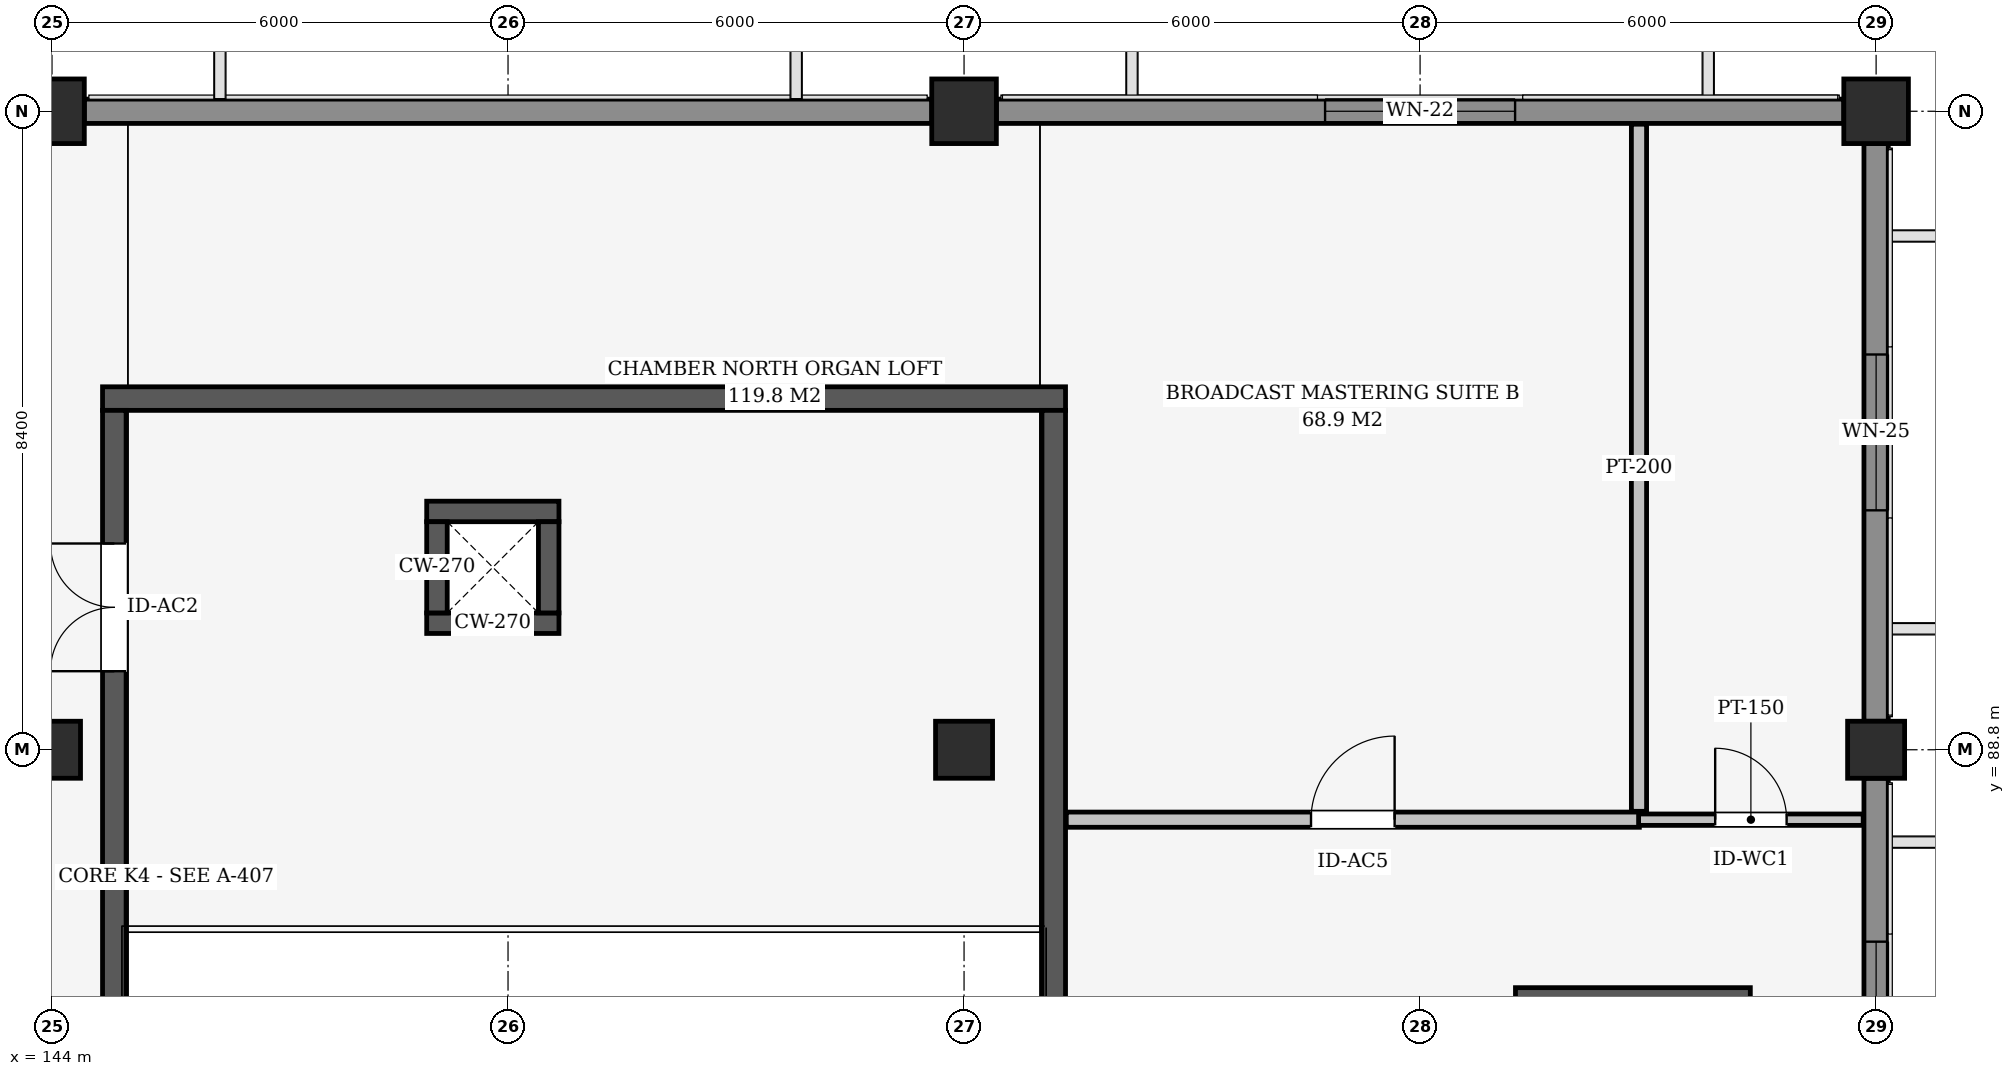
"""IFC4 building model, lengths in metres.
Left out: names, types, materials, properties, quantities, classifications, styles, units other than length and angle.
Written with IfcOpenShell. Run it as: python <this file> out.ifc"""

import sys

from ifc_helpers import new_model, si_unit, direction, frame, frame_2d, origin, origin_2d, place, context, subcontext, project, spatial, rectangle, extrude, element, fill, save


model = new_model("IFC4")
c1 = context("Model", 3, precision=1e-05, world=origin(), true_north=direction((0.0, 1.0)))
c2 = subcontext(c1, "Body", "Model", "MODEL_VIEW")
j1 = project(units=[si_unit("LENGTHUNIT", "METRE"), si_unit("PLANEANGLEUNIT", "RADIAN")], contexts=[c1])
p1 = place(None, origin())
s1 = spatial("IfcSite", under=j1, at=p1, CompositionType="ELEMENT")
p2 = place(p1, origin())
s2 = spatial("IfcBuilding", under=s1, at=p2, CompositionType="ELEMENT")
p3 = place(p2, frame((0.0, 0.0, 4.8)))
s3 = spatial("IfcBuildingStorey", under=s2, at=p3, CompositionType="ELEMENT", Elevation=4.8)
p4 = place(p3, frame((144.0, 88.8, 0.0), z_axis=(0.0, 0.0, 1.0), x_axis=(1.0, 0.0, 0.0)))
e1 = element("IfcColumn", 1, at=p4, inside=s3, PredefinedType="COLUMN", context=c2, shape_type="SweptSolid", body=[
    extrude(rectangle(XDim=0.75, YDim=0.75, at=origin_2d()), origin(), (0.0, 0.0, 1.0), 4.5),
])
p5 = place(p3, frame((144.0, 97.2, 0.0), z_axis=(0.0, 0.0, 1.0), x_axis=(1.0, 0.0, 0.0)))
e2 = element("IfcColumn", 2, at=p5, inside=s3, PredefinedType="COLUMN", context=c2, shape_type="SweptSolid", body=[
    extrude(rectangle(XDim=0.85, YDim=0.85, at=origin_2d()), origin(), (0.0, 0.0, 1.0), 4.5),
])
p6 = place(p3, frame((156.0, 88.8, 0.0), z_axis=(0.0, 0.0, 1.0), x_axis=(1.0, 0.0, 0.0)))
e3 = element("IfcColumn", 3, at=p6, inside=s3, PredefinedType="COLUMN", context=c2, shape_type="SweptSolid", body=[
    extrude(rectangle(XDim=0.75, YDim=0.75, at=origin_2d()), origin(), (0.0, 0.0, 1.0), 4.5),
])
p7 = place(p3, frame((156.0, 97.2, 0.0), z_axis=(0.0, 0.0, 1.0), x_axis=(1.0, 0.0, 0.0)))
e4 = element("IfcColumn", 4, at=p7, inside=s3, PredefinedType="COLUMN", context=c2, shape_type="SweptSolid", body=[
    extrude(rectangle(XDim=0.85, YDim=0.85, at=origin_2d()), origin(), (0.0, 0.0, 1.0), 4.5),
])
p8 = place(p3, frame((168.0, 88.8, 0.0), z_axis=(0.0, 0.0, 1.0), x_axis=(1.0, 0.0, 0.0)))
e5 = element("IfcColumn", 5, at=p8, inside=s3, PredefinedType="COLUMN", context=c2, shape_type="SweptSolid", body=[
    extrude(rectangle(XDim=0.75, YDim=0.75, at=origin_2d()), origin(), (0.0, 0.0, 1.0), 4.5),
])
p9 = place(p3, frame((168.0, 97.2, 0.0), z_axis=(0.0, 0.0, 1.0), x_axis=(1.0, 0.0, 0.0)))
e6 = element("IfcColumn", 6, at=p9, inside=s3, PredefinedType="COLUMN", context=c2, shape_type="SweptSolid", body=[
    extrude(rectangle(XDim=0.85, YDim=0.85, at=origin_2d()), origin(), (0.0, 0.0, 1.0), 4.5),
])
p10 = place(p3, frame((144.665, 93.42, 0.0), z_axis=(0.0, 0.0, 1.0), x_axis=(1.0, 0.0, 0.0)))
e7 = element("IfcWall", 7, at=p10, inside=s3, PredefinedType="SHEAR", context=c2, shape_type="SweptSolid", body=[
    extrude(rectangle(XDim=12.67, YDim=0.31, at=frame_2d((6.335, 0.0))), origin(), (0.0, 0.0, 1.0), 4.24),
])
p11 = place(p3, frame((144.82, 77.375, 0.0), z_axis=(0.0, 0.0, 1.0), x_axis=(0.0, 1.0, 0.0)))
e8 = element("IfcWall", 8, at=p11, inside=s3, PredefinedType="SHEAR", context=c2, shape_type="SweptSolid", body=[
    extrude(rectangle(XDim=15.89, YDim=0.31, at=frame_2d((7.945, 0.0))), origin(), (0.0, 0.0, 1.0), 4.24),
])
p12 = place(p11, frame((12.458, 0.0, 0.0)))
e9 = element("IfcOpeningElement", 9, at=p12, cuts=e8, PredefinedType="OPENING", context=c2, shape_type="SweptSolid", body=[
    extrude(rectangle(XDim=1.68, YDim=2.32, at=frame_2d((0.84, 1.16))), frame((0.0, 0.165, 0.0), z_axis=(0.0, -1.0, 0.0), x_axis=(1.0, 0.0, 0.0)), (0.0, 0.0, 1.0), 0.33),
])
p13 = place(p3, frame((157.18, 77.375, 0.0), z_axis=(0.0, 0.0, 1.0), x_axis=(0.0, 1.0, 0.0)))
e10 = element("IfcWall", 10, at=p13, inside=s3, PredefinedType="SHEAR", context=c2, shape_type="SweptSolid", body=[
    extrude(rectangle(XDim=15.89, YDim=0.31, at=frame_2d((7.945, 0.0))), origin(), (0.0, 0.0, 1.0), 4.24),
])
p14 = place(p3, frame((144.425, 97.2, 0.0), z_axis=(0.0, 0.0, 1.0), x_axis=(1.0, 0.0, 0.0)))
e11 = element("IfcWall", 11, at=p14, inside=s3, PredefinedType="SOLIDWALL", context=c2, shape_type="SweptSolid", body=[
    extrude(rectangle(XDim=11.15, YDim=0.32, at=frame_2d((5.575, 0.0))), origin(), (0.0, 0.0, 1.0), 3.684),
])
p15 = place(p3, frame((156.425, 97.2, 0.0), z_axis=(0.0, 0.0, 1.0), x_axis=(1.0, 0.0, 0.0)))
e12 = element("IfcWall", 12, at=p15, inside=s3, PredefinedType="SOLIDWALL", context=c2, shape_type="SweptSolid", body=[
    extrude(rectangle(XDim=11.15, YDim=0.32, at=frame_2d((5.575, 0.0))), origin(), (0.0, 0.0, 1.0), 3.684),
])
p16 = place(p15, frame((4.325, 0.0, 0.85)))
e13 = element("IfcOpeningElement", 13, at=p16, cuts=e12, PredefinedType="OPENING", context=c2, shape_type="SweptSolid", body=[
    extrude(rectangle(XDim=2.5, YDim=1.9, at=frame_2d((1.25, 0.95))), frame((0.0, 0.17, 0.0), z_axis=(0.0, -1.0, 0.0), x_axis=(1.0, 0.0, 0.0)), (0.0, 0.0, 1.0), 0.34),
])
p17 = place(p3, frame((168.0, 88.425, 0.0), z_axis=(0.0, 0.0, 1.0), x_axis=(0.0, -1.0, 0.0)))
e14 = element("IfcWall", 14, at=p17, inside=s3, PredefinedType="SOLIDWALL", context=c2, shape_type="SweptSolid", body=[
    extrude(rectangle(XDim=5.25, YDim=0.32, at=frame_2d((2.625, 0.0))), origin(), (0.0, 0.0, 1.0), 3.608),
])
p18 = place(p17, frame((2.15, 0.0, 0.85)))
e15 = element("IfcOpeningElement", 15, at=p18, cuts=e14, PredefinedType="OPENING", context=c2, shape_type="SweptSolid", body=[
    extrude(rectangle(XDim=2.55, YDim=1.05, at=frame_2d((1.275, 0.525))), frame((0.0, 0.17, 0.0), z_axis=(0.0, -1.0, 0.0), x_axis=(1.0, 0.0, 0.0)), (0.0, 0.0, 1.0), 0.34),
])
p19 = place(p3, frame((168.0, 96.775, 0.0), z_axis=(0.0, 0.0, 1.0), x_axis=(0.0, -1.0, 0.0)))
e16 = element("IfcWall", 16, at=p19, inside=s3, PredefinedType="SOLIDWALL", context=c2, shape_type="SweptSolid", body=[
    extrude(rectangle(XDim=7.6, YDim=0.32, at=frame_2d((3.8, 0.0))), origin(), (0.0, 0.0, 1.0), 3.608),
])
p20 = place(p19, frame((2.775, 0.0, 0.85)))
e17 = element("IfcOpeningElement", 17, at=p20, cuts=e16, PredefinedType="OPENING", context=c2, shape_type="SweptSolid", body=[
    extrude(rectangle(XDim=2.05, YDim=1.5, at=frame_2d((1.025, 0.75))), frame((0.0, 0.17, 0.0), z_axis=(0.0, -1.0, 0.0), x_axis=(1.0, 0.0, 0.0)), (0.0, 0.0, 1.0), 0.34),
])
for number, where, z_axis, x_axis in (
    (18, (148.93, 90.465, 0.0), (0.0, 0.0, 1.0), (1.0, 0.0, 0.0)),
    (19, (148.93, 91.935, 0.0), (0.0, 0.0, 1.0), (1.0, 0.0, 0.0)),
):
    element("IfcWall", number, at=place(p3, frame(where, z_axis=z_axis, x_axis=x_axis)), inside=s3, PredefinedType="SHEAR", context=c2, shape_type="SweptSolid", body=[
        extrude(rectangle(XDim=1.74, YDim=0.27, at=frame_2d((0.87, 0.0))), origin(), (0.0, 0.0, 1.0), 4.24),
    ])
for number, where, z_axis, x_axis in (
    (20, (149.065, 90.6, 0.0), (0.0, 0.0, 1.0), (0.0, 1.0, 0.0)),
    (21, (150.535, 90.6, 0.0), (0.0, 0.0, 1.0), (0.0, 1.0, 0.0)),
):
    element("IfcWall", number, at=place(p3, frame(where, z_axis=z_axis, x_axis=x_axis)), inside=s3, PredefinedType="SHEAR", context=c2, shape_type="SweptSolid", body=[
        extrude(rectangle(XDim=1.2, YDim=0.27, at=frame_2d((0.6, 0.0))), origin(), (0.0, 0.0, 1.0), 4.24),
    ])
p21 = place(p3, frame((163.255, 85.535, 0.0), z_axis=(0.0, 0.0, 1.0), x_axis=(1.0, 0.0, 0.0)))
e22 = element("IfcWall", 22, at=p21, inside=s3, PredefinedType="SHEAR", context=c2, shape_type="SweptSolid", body=[
    extrude(rectangle(XDim=3.09, YDim=0.27, at=frame_2d((1.545, 0.0))), origin(), (0.0, 0.0, 1.0), 4.24),
])
p22 = place(p3, frame((157.345, 87.88, 0.0), z_axis=(0.0, 0.0, 1.0), x_axis=(1.0, 0.0, 0.0)))
e23 = element("IfcWall", 23, at=p22, inside=s3, PredefinedType="PARTITIONING", context=c2, shape_type="SweptSolid", body=[
    extrude(rectangle(XDim=7.54, YDim=0.2, at=frame_2d((3.77, 0.0))), origin(), (0.0, 0.0, 1.0), 4.22),
])
p23 = place(p22, frame((3.22, 0.0, 0.0)))
e24 = element("IfcOpeningElement", 24, at=p23, cuts=e23, PredefinedType="OPENING", context=c2, shape_type="SweptSolid", body=[
    extrude(rectangle(XDim=1.1, YDim=2.26, at=frame_2d((0.55, 1.13))), frame((0.0, 0.11, 0.0), z_axis=(0.0, -1.0, 0.0), x_axis=(1.0, 0.0, 0.0)), (0.0, 0.0, 1.0), 0.22),
])
p24 = place(p3, frame((164.875, 87.88, 0.0), z_axis=(0.0, 0.0, 1.0), x_axis=(1.0, 0.0, 0.0)))
e25 = element("IfcWall", 25, at=p24, inside=s3, PredefinedType="PARTITIONING", context=c2, shape_type="SweptSolid", body=[
    extrude(rectangle(XDim=2.955, YDim=0.15, at=frame_2d((1.478, 0.0))), origin(), (0.0, 0.0, 1.0), 4.22),
])
p25 = place(p24, frame((1.008, 0.0, 0.0)))
e26 = element("IfcOpeningElement", 26, at=p25, cuts=e25, PredefinedType="OPENING", context=c2, shape_type="SweptSolid", body=[
    extrude(rectangle(XDim=0.94, YDim=2.1, at=frame_2d((0.47, 1.05))), frame((0.0, 0.085, 0.0), z_axis=(0.0, -1.0, 0.0), x_axis=(1.0, 0.0, 0.0)), (0.0, 0.0, 1.0), 0.17),
])
p26 = place(p3, frame((164.88, 87.99, 0.0), z_axis=(0.0, 0.0, 1.0), x_axis=(0.0, 1.0, 0.0)))
e27 = element("IfcWall", 27, at=p26, inside=s3, PredefinedType="PARTITIONING", context=c2, shape_type="SweptSolid", body=[
    extrude(rectangle(XDim=9.04, YDim=0.2, at=frame_2d((4.52, 0.0))), origin(), (0.0, 0.0, 1.0), 3.763),
])
p27 = place(p16, origin())
e28 = element("IfcWindow", 28, at=p27, inside=s3, PartitioningType="SINGLE_PANEL", PredefinedType="WINDOW", context=c2, shape_type="SweptSolid", body=[
    extrude(rectangle(XDim=2.5, YDim=1.9, at=frame_2d((1.25, 0.95))), frame((0.0, 0.03, 0.0), z_axis=(0.0, -1.0, 0.0), x_axis=(1.0, 0.0, 0.0)), (0.0, 0.0, 1.0), 0.06),
])
fill(e13, e28)
p28 = place(p18, origin())
e29 = element("IfcWindow", 29, at=p28, inside=s3, PartitioningType="SINGLE_PANEL", PredefinedType="WINDOW", context=c2, shape_type="SweptSolid", body=[
    extrude(rectangle(XDim=2.55, YDim=1.05, at=frame_2d((1.275, 0.525))), frame((0.0, 0.03, 0.0), z_axis=(0.0, -1.0, 0.0), x_axis=(1.0, 0.0, 0.0)), (0.0, 0.0, 1.0), 0.06),
])
fill(e15, e29)
p29 = place(p20, origin())
e30 = element("IfcWindow", 30, at=p29, inside=s3, PartitioningType="SINGLE_PANEL", PredefinedType="WINDOW", context=c2, shape_type="SweptSolid", body=[
    extrude(rectangle(XDim=2.05, YDim=1.5, at=frame_2d((1.025, 0.75))), frame((0.0, 0.03, 0.0), z_axis=(0.0, -1.0, 0.0), x_axis=(1.0, 0.0, 0.0)), (0.0, 0.0, 1.0), 0.06),
])
fill(e17, e30)
p30 = place(p12, origin())
e31 = element("IfcDoor", 31, at=p30, inside=s3, OperationType="DOUBLE_DOOR_SINGLE_SWING", PredefinedType="DOOR", context=c2, shape_type="SweptSolid", body=[
    extrude(rectangle(XDim=1.68, YDim=2.32, at=frame_2d((0.84, 1.16))), frame((0.0, 0.025, 0.0), z_axis=(0.0, -1.0, 0.0), x_axis=(1.0, 0.0, 0.0)), (0.0, 0.0, 1.0), 0.05),
])
fill(e9, e31)
p31 = place(p23, origin())
e32 = element("IfcDoor", 32, at=p31, inside=s3, OperationType="SINGLE_SWING_RIGHT", PredefinedType="DOOR", context=c2, shape_type="SweptSolid", body=[
    extrude(rectangle(XDim=1.1, YDim=2.26, at=frame_2d((0.55, 1.13))), frame((0.0, 0.025, 0.0), z_axis=(0.0, -1.0, 0.0), x_axis=(1.0, 0.0, 0.0)), (0.0, 0.0, 1.0), 0.05),
])
fill(e24, e32)
p32 = place(p25, origin())
e33 = element("IfcDoor", 33, at=p32, inside=s3, OperationType="SINGLE_SWING_LEFT", PredefinedType="DOOR", context=c2, shape_type="SweptSolid", body=[
    extrude(rectangle(XDim=0.94, YDim=2.1, at=frame_2d((0.47, 1.05))), frame((0.0, 0.025, 0.0), z_axis=(0.0, -1.0, 0.0), x_axis=(1.0, 0.0, 0.0)), (0.0, 0.0, 1.0), 0.05),
])
fill(e26, e33)
save(model, sys.argv[1])
